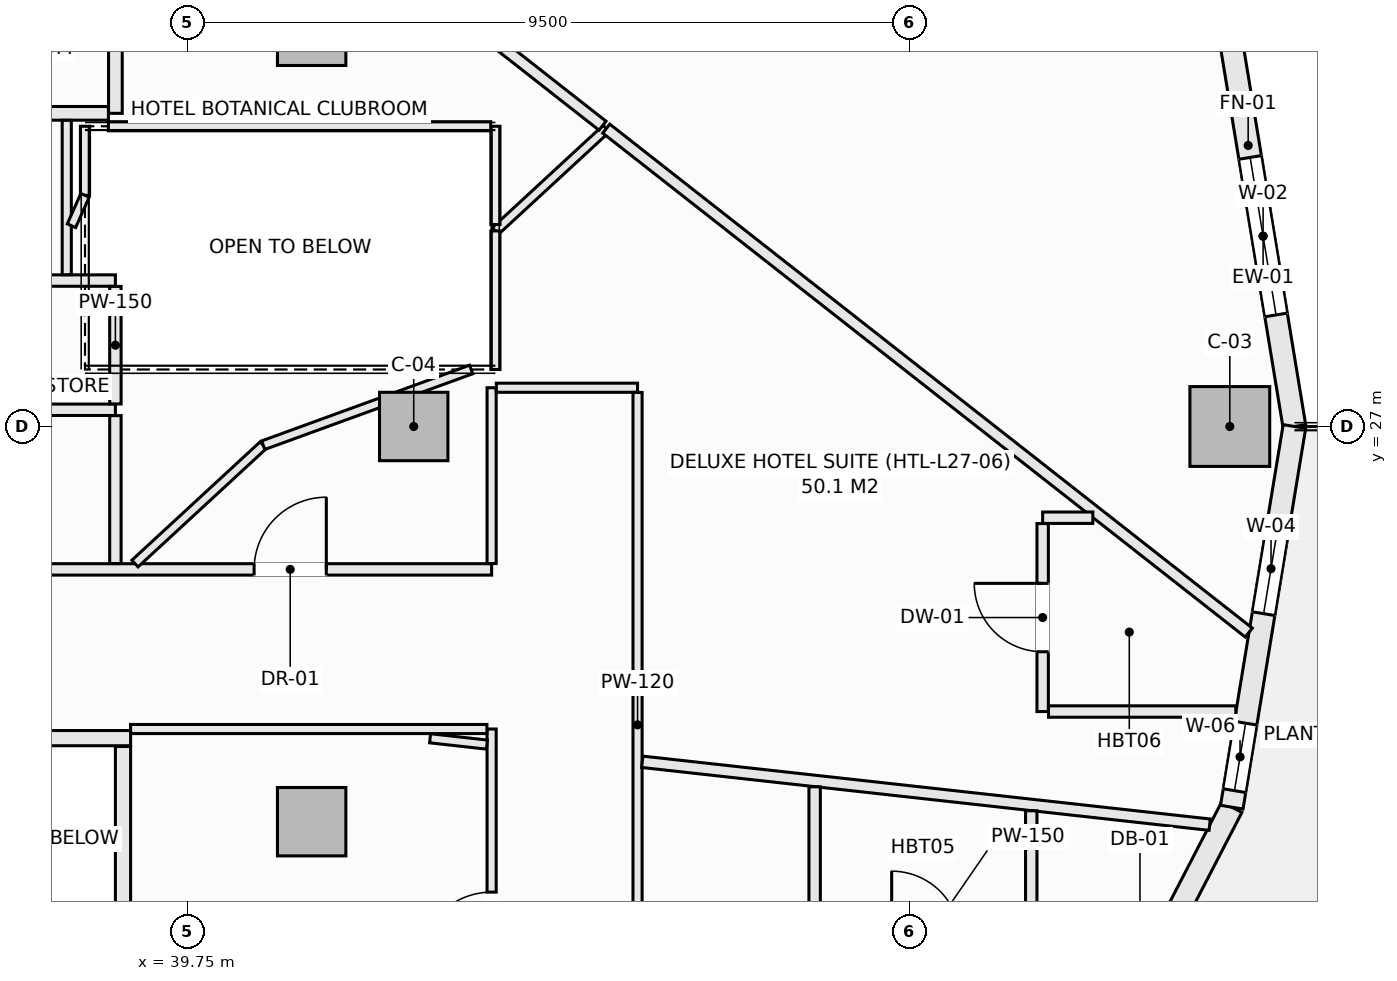
"""IFC4 building model, lengths in metres.
Left out: names, types, materials, properties, quantities, classifications, styles, units other than length and angle.
Written with IfcOpenShell. Run it as: python <this file> out.ifc"""

import sys

from ifc_helpers import new_model, si_unit, direction, frame, frame_2d, origin, origin_2d, place, context, subcontext, project, spatial, rectangle, extrude, element, fill, save


model = new_model("IFC4")
c1 = context("Model", 3, precision=1e-05, world=origin(), true_north=direction((0.0, 1.0)))
c2 = subcontext(c1, "Body", "Model", "MODEL_VIEW")
j1 = project(units=[si_unit("LENGTHUNIT", "METRE"), si_unit("PLANEANGLEUNIT", "RADIAN")], contexts=[c1])
p1 = place(None, origin())
s1 = spatial("IfcSite", under=j1, at=p1, CompositionType="ELEMENT")
p2 = place(p1, origin())
s2 = spatial("IfcBuilding", under=s1, at=p2, CompositionType="ELEMENT")
p3 = place(p2, frame((0.0, 0.0, 112.1)))
s3 = spatial("IfcBuildingStorey", under=s2, at=p3, CompositionType="ELEMENT", Elevation=112.1)
p4 = place(p3, frame((53.462, 27.0, -0.27), z_axis=(0.0, 0.0, 1.0), x_axis=(1.0, 0.0, 0.0)))
e1 = element("IfcColumn", 1, at=p4, inside=s3, PredefinedType="COLUMN", context=c2, shape_type="SweptSolid", body=[
    extrude(rectangle(XDim=1.05, YDim=1.05, at=origin_2d()), origin(), (0.0, 0.0, 1.0), 3.4),
])
for number, where, z_axis, x_axis in (
    (2, (42.725, 27.0, -0.27), (0.0, 0.0, 1.0), (1.0, 0.0, 0.0)),
    (3, (41.382, 32.199, -0.27), (0.0, 0.0, 1.0), (1.0, 0.0, 0.0)),
    (4, (41.382, 21.801, -0.27), (0.0, 0.0, 1.0), (1.0, 0.0, 0.0)),
):
    element("IfcColumn", number, at=place(p3, frame(where, z_axis=z_axis, x_axis=x_axis)), inside=s3, PredefinedType="COLUMN", context=c2, shape_type="SweptSolid", body=[
        extrude(rectangle(XDim=0.9, YDim=0.9, at=origin_2d()), origin(), (0.0, 0.0, 1.0), 3.4),
    ])
p5 = place(p3, frame((53.488, 32.008, 0.0), z_axis=(0.0, 0.0, 1.0), x_axis=(0.162393944769, -0.986726003864, 0.0)))
e5 = element("IfcWall", 5, at=p5, inside=s3, PredefinedType="SOLIDWALL", context=c2, shape_type="SweptSolid", body=[
    extrude(rectangle(XDim=5.075, YDim=0.3, at=frame_2d((2.538, 0.0))), origin(), (0.0, 0.0, 1.0), 2.653),
])
p6 = place(p5, frame((1.488, 0.0, 0.74)))
e6 = element("IfcOpeningElement", 6, at=p6, cuts=e5, PredefinedType="OPENING", context=c2, shape_type="SweptSolid", body=[
    extrude(rectangle(XDim=2.1, YDim=1.7, at=frame_2d((1.05, 0.85))), frame((0.0, 0.16, 0.0), z_axis=(0.0, -1.0, 0.0), x_axis=(1.0, 0.0, 0.0)), (0.0, 0.0, 1.0), 0.32),
])
p7 = place(p3, frame((51.072, 17.325, 0.0), z_axis=(0.0, 0.0, 1.0), x_axis=(0.459767899643, 0.888039119892, 0.0)))
e7 = element("IfcWall", 7, at=p7, inside=s3, PredefinedType="SOLIDWALL", context=c2, shape_type="SweptSolid", body=[
    extrude(rectangle(XDim=5.255, YDim=0.3, at=frame_2d((2.628, 0.0))), origin(), (0.0, 0.0, 1.0), 2.653),
])
p8 = place(p7, frame((1.728, 0.0, 0.0)))
e8 = element("IfcOpeningElement", 8, at=p8, cuts=e7, PredefinedType="OPENING", context=c2, shape_type="SweptSolid", body=[
    extrude(rectangle(XDim=1.8, YDim=2.25, at=frame_2d((0.9, 1.125))), frame((0.0, 0.16, 0.0), z_axis=(0.0, -1.0, 0.0), x_axis=(1.0, 0.0, 0.0)), (0.0, 0.0, 1.0), 0.32),
])
p9 = place(p3, frame((53.488, 21.992, 0.0), z_axis=(0.0, 0.0, 1.0), x_axis=(0.162393944769, 0.986726003864, 0.0)))
e9 = element("IfcWall", 9, at=p9, inside=s3, PredefinedType="SOLIDWALL", context=c2, shape_type="SweptSolid", body=[
    extrude(rectangle(XDim=5.075, YDim=0.3, at=frame_2d((2.538, 0.0))), origin(), (0.0, 0.0, 1.0), 2.653),
])
p10 = place(p9, frame((2.58, 0.0, 0.72)))
e10 = element("IfcOpeningElement", 10, at=p10, cuts=e9, PredefinedType="OPENING", context=c2, shape_type="SweptSolid", body=[
    extrude(rectangle(XDim=1.2, YDim=1.65, at=frame_2d((0.6, 0.825))), frame((0.0, 0.16, 0.0), z_axis=(0.0, -1.0, 0.0), x_axis=(1.0, 0.0, 0.0)), (0.0, 0.0, 1.0), 0.32),
])
p11 = place(p9, frame((0.22, 0.0, 0.72)))
e11 = element("IfcOpeningElement", 11, at=p11, cuts=e9, PredefinedType="OPENING", context=c2, shape_type="SweptSolid", body=[
    extrude(rectangle(XDim=0.9, YDim=1.65, at=frame_2d((0.45, 0.825))), frame((0.0, 0.16, 0.0), z_axis=(0.0, -1.0, 0.0), x_axis=(1.0, 0.0, 0.0)), (0.0, 0.0, 1.0), 0.32),
])
p12 = place(p3, frame((54.129, 15.878, 0.0), z_axis=(0.0, 0.0, 1.0), x_axis=(0.441269631716, 0.897374566235, 0.0)))
e12 = element("IfcWall", 12, at=p12, inside=s3, PredefinedType="PARAPET", context=c2, shape_type="SweptSolid", body=[
    extrude(rectangle(XDim=6.056, YDim=0.22, at=frame_2d((3.028, 0.0))), origin(), (0.0, 0.0, 1.0), 0.52),
])
p13 = place(p3, frame((36.75, 22.9, 0.0), z_axis=(0.0, 0.0, 1.0), x_axis=(1.0, 0.0, 0.0)))
e13 = element("IfcWall", 13, at=p13, inside=s3, PredefinedType="SOLIDWALL", context=c2, shape_type="SweptSolid", body=[
    extrude(rectangle(XDim=2.25, YDim=0.2, at=frame_2d((1.125, 0.0))), origin(), (0.0, 0.0, 1.0), 3.13),
])
p14 = place(p3, frame((38.9, 20.36, 0.0), z_axis=(0.0, 0.0, 1.0), x_axis=(0.0, 1.0, 0.0)))
e14 = element("IfcWall", 14, at=p14, inside=s3, PredefinedType="SOLIDWALL", context=c2, shape_type="SweptSolid", body=[
    extrude(rectangle(XDim=2.43, YDim=0.2, at=frame_2d((1.215, 0.0))), origin(), (0.0, 0.0, 1.0), 3.13),
])
p15 = place(p3, frame((30.077, 28.92, 0.0), z_axis=(0.0, 0.0, 1.0), x_axis=(1.0, 0.0, 0.0)))
e15 = element("IfcWall", 15, at=p15, inside=s3, PredefinedType="PARTITIONING", context=c2, shape_type="SweptSolid", body=[
    extrude(rectangle(XDim=8.723, YDim=0.15, at=frame_2d((4.362, 0.0))), origin(), (0.0, 0.0, 1.0), 3.13),
])
p16 = place(p15, frame((1.342, 0.0, 0.0)))
e16 = element("IfcOpeningElement", 16, at=p16, cuts=e15, PredefinedType="OPENING", context=c2, shape_type="SweptSolid", body=[
    extrude(rectangle(XDim=0.95, YDim=2.1, at=frame_2d((0.475, 1.05))), frame((0.0, 0.085, 0.0), z_axis=(0.0, -1.0, 0.0), x_axis=(1.0, 0.0, 0.0)), (0.0, 0.0, 1.0), 0.17),
])
p17 = place(p15, frame((5.178, 0.0, 0.0)))
e17 = element("IfcOpeningElement", 17, at=p17, cuts=e15, PredefinedType="OPENING", context=c2, shape_type="SweptSolid", body=[
    extrude(rectangle(XDim=0.95, YDim=2.1, at=frame_2d((0.475, 1.05))), frame((0.0, 0.085, 0.0), z_axis=(0.0, -1.0, 0.0), x_axis=(1.0, 0.0, 0.0)), (0.0, 0.0, 1.0), 0.17),
])
p18 = place(p3, frame((33.377, 25.12, 0.0), z_axis=(0.0, 0.0, 1.0), x_axis=(1.0, 0.0, 0.0)))
e18 = element("IfcWall", 18, at=p18, inside=s3, PredefinedType="PARTITIONING", context=c2, shape_type="SweptSolid", body=[
    extrude(rectangle(XDim=10.373, YDim=0.15, at=frame_2d((5.187, 0.0))), origin(), (0.0, 0.0, 1.0), 3.13),
])
p19 = place(p18, frame((2.441, 0.0, 0.0)))
e19 = element("IfcOpeningElement", 19, at=p19, cuts=e18, PredefinedType="OPENING", context=c2, shape_type="SweptSolid", body=[
    extrude(rectangle(XDim=0.95, YDim=2.1, at=frame_2d((0.475, 1.05))), frame((0.0, 0.085, 0.0), z_axis=(0.0, -1.0, 0.0), x_axis=(1.0, 0.0, 0.0)), (0.0, 0.0, 1.0), 0.17),
])
p20 = place(p18, frame((7.248, 0.0, 0.0)))
e20 = element("IfcOpeningElement", 20, at=p20, cuts=e18, PredefinedType="OPENING", context=c2, shape_type="SweptSolid", body=[
    extrude(rectangle(XDim=0.95, YDim=2.1, at=frame_2d((0.475, 1.05))), frame((0.0, 0.085, 0.0), z_axis=(0.0, -1.0, 0.0), x_axis=(1.0, 0.0, 0.0)), (0.0, 0.0, 1.0), 0.17),
])
p21 = place(p3, frame((33.377, 27.22, 0.0), z_axis=(0.0, 0.0, 1.0), x_axis=(1.0, 0.0, 0.0)))
e21 = element("IfcWall", 21, at=p21, inside=s3, PredefinedType="PARTITIONING", context=c2, shape_type="SweptSolid", body=[
    extrude(rectangle(XDim=5.423, YDim=0.15, at=frame_2d((2.711, 0.0))), origin(), (0.0, 0.0, 1.0), 3.13),
])
p22 = place(p3, frame((38.8, 25.197, 0.0), z_axis=(0.0, 0.0, 1.0), x_axis=(0.0, 1.0, 0.0)))
e22 = element("IfcWall", 22, at=p22, inside=s3, PredefinedType="PARTITIONING", context=c2, shape_type="SweptSolid", body=[
    extrude(rectangle(XDim=1.946, YDim=0.15, at=frame_2d((0.973, 0.0))), origin(), (0.0, 0.0, 1.0), 3.13),
])
p23 = place(p3, frame((38.8, 27.297, 0.0), z_axis=(0.0, 0.0, 1.0), x_axis=(0.0, 1.0, 0.0)))
e23 = element("IfcWall", 23, at=p23, inside=s3, PredefinedType="PARTITIONING", context=c2, shape_type="SweptSolid", body=[
    extrude(rectangle(XDim=1.546, YDim=0.15, at=frame_2d((0.773, 0.0))), origin(), (0.0, 0.0, 1.0), 3.13),
])
p24 = place(p3, frame((38.8, 31.12, 0.0), z_axis=(0.0, 0.0, 1.0), x_axis=(0.0, 1.0, 0.0)))
e24 = element("IfcWall", 24, at=p24, inside=s3, PredefinedType="SOLIDWALL", context=c2, shape_type="SweptSolid", body=[
    extrude(rectangle(XDim=2.63, YDim=0.18, at=frame_2d((1.315, 0.0))), origin(), (0.0, 0.0, 1.0), 3.13),
])
p25 = place(p3, frame((30.077, 31.12, 0.0), z_axis=(0.0, 0.0, 1.0), x_axis=(1.0, 0.0, 0.0)))
e25 = element("IfcWall", 25, at=p25, inside=s3, PredefinedType="SOLIDWALL", context=c2, shape_type="SweptSolid", body=[
    extrude(rectangle(XDim=8.631, YDim=0.18, at=frame_2d((4.315, 0.0))), origin(), (0.0, 0.0, 1.0), 3.13),
])
p26 = place(p25, frame((2.592, 0.0, 0.0)))
e26 = element("IfcOpeningElement", 26, at=p26, cuts=e25, PredefinedType="OPENING", context=c2, shape_type="SweptSolid", body=[
    extrude(rectangle(XDim=0.95, YDim=2.1, at=frame_2d((0.475, 1.05))), frame((0.0, 0.1, 0.0), z_axis=(0.0, -1.0, 0.0), x_axis=(1.0, 0.0, 0.0)), (0.0, 0.0, 1.0), 0.2),
])
p27 = place(p3, frame((38.16, 28.997, 0.0), z_axis=(0.0, 0.0, 1.0), x_axis=(0.0, 1.0, 0.0)))
e27 = element("IfcWall", 27, at=p27, inside=s3, PredefinedType="PARTITIONING", context=c2, shape_type="SweptSolid", body=[
    extrude(rectangle(XDim=2.031, YDim=0.12, at=frame_2d((1.016, 0.0))), origin(), (0.0, 0.0, 1.0), 3.13),
])
p28 = place(p3, frame((43.75, 17.779, 0.0), z_axis=(0.0, 0.0, 1.0), x_axis=(0.0, 1.0, 0.0)))
e28 = element("IfcWall", 28, at=p28, inside=s3, PredefinedType="PARTITIONING", context=c2, shape_type="SweptSolid", body=[
    extrude(rectangle(XDim=5.241, YDim=0.12, at=frame_2d((2.621, 0.0))), origin(), (0.0, 0.0, 1.0), 3.13),
])
p29 = place(p28, frame((2.146, 0.0, 0.0)))
e29 = element("IfcOpeningElement", 29, at=p29, cuts=e28, PredefinedType="OPENING", context=c2, shape_type="SweptSolid", body=[
    extrude(rectangle(XDim=0.95, YDim=2.1, at=frame_2d((0.475, 1.05))), frame((0.0, 0.07, 0.0), z_axis=(0.0, -1.0, 0.0), x_axis=(1.0, 0.0, 0.0)), (0.0, 0.0, 1.0), 0.14),
])
p30 = place(p3, frame((43.75, 25.197, 0.0), z_axis=(0.0, 0.0, 1.0), x_axis=(0.0, 1.0, 0.0)))
e30 = element("IfcWall", 30, at=p30, inside=s3, PredefinedType="PARTITIONING", context=c2, shape_type="SweptSolid", body=[
    extrude(rectangle(XDim=2.313, YDim=0.12, at=frame_2d((1.156, 0.0))), origin(), (0.0, 0.0, 1.0), 3.13),
])
p31 = place(p3, frame((43.812, 27.51, 0.0), z_axis=(0.0, 0.0, 1.0), x_axis=(1.0, 0.0, 0.0)))
e31 = element("IfcWall", 31, at=p31, inside=s3, PredefinedType="PARTITIONING", context=c2, shape_type="SweptSolid", body=[
    extrude(rectangle(XDim=1.858, YDim=0.12, at=frame_2d((0.929, 0.0))), origin(), (0.0, 0.0, 1.0), 3.13),
])
p32 = place(p3, frame((45.67, 18.701, 0.0), z_axis=(0.0, 0.0, 1.0), x_axis=(0.0, 1.0, 0.0)))
e32 = element("IfcWall", 32, at=p32, inside=s3, PredefinedType="PARTITIONING", context=c2, shape_type="SweptSolid", body=[
    extrude(rectangle(XDim=8.747, YDim=0.12, at=frame_2d((4.374, 0.0))), origin(), (0.0, 0.0, 1.0), 3.13),
])
p33 = place(p3, frame((39.0, 23.02, 0.0), z_axis=(0.0, 0.0, 1.0), x_axis=(1.0, 0.0, 0.0)))
e33 = element("IfcWall", 33, at=p33, inside=s3, PredefinedType="PARTITIONING", context=c2, shape_type="SweptSolid", body=[
    extrude(rectangle(XDim=4.688, YDim=0.12, at=frame_2d((2.344, 0.0))), origin(), (0.0, 0.0, 1.0), 3.13),
])
p34 = place(p3, frame((42.941, 22.898, 0.0), z_axis=(0.0, 0.0, 1.0), x_axis=(0.993923268999, -0.110075134986, 0.0)))
e34 = element("IfcWall", 34, at=p34, inside=s3, PredefinedType="PARTITIONING", context=c2, shape_type="SweptSolid", body=[
    extrude(rectangle(XDim=0.752, YDim=0.12, at=frame_2d((0.376, 0.0))), origin(), (0.0, 0.0, 1.0), 3.13),
])
p35 = place(p3, frame((45.732, 22.589, 0.0), z_axis=(0.0, 0.0, 1.0), x_axis=(0.993915007742, -0.110149704422, 0.0)))
e35 = element("IfcWall", 35, at=p35, inside=s3, PredefinedType="PARTITIONING", context=c2, shape_type="SweptSolid", body=[
    extrude(rectangle(XDim=7.511, YDim=0.15, at=frame_2d((3.756, 0.0))), origin(), (0.0, 0.0, 1.0), 3.13),
])
p36 = place(p3, frame((48.0, 20.25, 0.0), z_axis=(0.0, 0.0, 1.0), x_axis=(0.0, 1.0, 0.0)))
e36 = element("IfcWall", 36, at=p36, inside=s3, PredefinedType="PARTITIONING", context=c2, shape_type="SweptSolid", body=[
    extrude(rectangle(XDim=2.01, YDim=0.15, at=frame_2d((1.005, 0.0))), origin(), (0.0, 0.0, 1.0), 3.13),
])
p37 = place(p3, frame((50.85, 20.327, 0.0), z_axis=(0.0, 0.0, 1.0), x_axis=(0.0, 1.0, 0.0)))
e37 = element("IfcWall", 37, at=p37, inside=s3, PredefinedType="PARTITIONING", context=c2, shape_type="SweptSolid", body=[
    extrude(rectangle(XDim=1.617, YDim=0.15, at=frame_2d((0.809, 0.0))), origin(), (0.0, 0.0, 1.0), 3.13),
])
p38 = place(p3, frame((39.058, 25.197, 0.0), z_axis=(0.0, 0.0, 1.0), x_axis=(0.73497871786, 0.67809017416, 0.0)))
e38 = element("IfcWall", 38, at=p38, inside=s3, PredefinedType="PARTITIONING", context=c2, shape_type="SweptSolid", body=[
    extrude(rectangle(XDim=2.296, YDim=0.12, at=frame_2d((1.148, 0.0))), origin(), (0.0, 0.0, 1.0), 3.13),
])
p39 = place(p3, frame((43.8, 29.573, 0.0), z_axis=(0.0, 0.0, 1.0), x_axis=(0.734897778704, 0.678177893222, 0.0)))
e39 = element("IfcWall", 39, at=p39, inside=s3, PredefinedType="PARTITIONING", context=c2, shape_type="SweptSolid", body=[
    extrude(rectangle(XDim=1.984, YDim=0.12, at=frame_2d((0.992, 0.0))), origin(), (0.0, 0.0, 1.0), 3.13),
])
p40 = place(p3, frame((40.745, 26.754, 0.0), z_axis=(0.0, 0.0, 1.0), x_axis=(0.939656245212, 0.342120067862, 0.0)))
e40 = element("IfcWall", 40, at=p40, inside=s3, PredefinedType="PARTITIONING", context=c2, shape_type="SweptSolid", body=[
    extrude(rectangle(XDim=2.912, YDim=0.12, at=frame_2d((1.456, 0.0))), origin(), (0.0, 0.0, 1.0), 3.13),
])
p41 = place(p3, frame((43.8, 27.75, 0.0), z_axis=(0.0, 0.0, 1.0), x_axis=(0.0, 1.0, 0.0)))
e41 = element("IfcWall", 41, at=p41, inside=s3, PredefinedType="PARTITIONING", context=c2, shape_type="SweptSolid", body=[
    extrude(rectangle(XDim=1.823, YDim=0.12, at=frame_2d((0.912, 0.0))), origin(), (0.0, 0.0, 1.0), 3.13),
])
p42 = place(p3, frame((43.8, 29.657, 0.0), z_axis=(0.0, 0.0, 1.0), x_axis=(0.0, 1.0, 0.0)))
e42 = element("IfcWall", 42, at=p42, inside=s3, PredefinedType="PARTITIONING", context=c2, shape_type="SweptSolid", body=[
    extrude(rectangle(XDim=1.293, YDim=0.12, at=frame_2d((0.646, 0.0))), origin(), (0.0, 0.0, 1.0), 3.13),
])
p43 = place(p3, frame((34.112, 39.661, 0.0), z_axis=(0.0, 0.0, 1.0), x_axis=(0.786863471843, -0.617127115495, 0.0)))
e43 = element("IfcWall", 43, at=p43, inside=s3, PredefinedType="PARTITIONING", context=c2, shape_type="SweptSolid", body=[
    extrude(rectangle(XDim=14.103, YDim=0.15, at=frame_2d((7.052, 0.0))), origin(), (0.0, 0.0, 1.0), 2.505),
])
p44 = place(p3, frame((45.258, 30.919, 0.0), z_axis=(0.0, 0.0, 1.0), x_axis=(0.786869212034, -0.617119796436, 0.0)))
e44 = element("IfcWall", 44, at=p44, inside=s3, PredefinedType="PARTITIONING", context=c2, shape_type="SweptSolid", body=[
    extrude(rectangle(XDim=10.744, YDim=0.15, at=frame_2d((5.372, 0.0))), origin(), (0.0, 0.0, 1.0), 2.505),
])
p45 = place(p3, frame((51.0, 25.8, 0.0), z_axis=(0.0, 0.0, 1.0), x_axis=(1.0, 0.0, 0.0)))
e45 = element("IfcWall", 45, at=p45, inside=s3, PredefinedType="PARTITIONING", context=c2, shape_type="SweptSolid", body=[
    extrude(rectangle(XDim=0.66, YDim=0.15, at=frame_2d((0.33, 0.0))), origin(), (0.0, 0.0, 1.0), 3.13),
])
p46 = place(p3, frame((51.0, 23.25, 0.0), z_axis=(0.0, 0.0, 1.0), x_axis=(0.0, 1.0, 0.0)))
e46 = element("IfcWall", 46, at=p46, inside=s3, PredefinedType="PARTITIONING", context=c2, shape_type="SweptSolid", body=[
    extrude(rectangle(XDim=2.473, YDim=0.15, at=frame_2d((1.236, 0.0))), origin(), (0.0, 0.0, 1.0), 3.13),
])
p47 = place(p46, frame((0.787, 0.0, 0.0)))
e47 = element("IfcOpeningElement", 47, at=p47, cuts=e46, PredefinedType="OPENING", context=c2, shape_type="SweptSolid", body=[
    extrude(rectangle(XDim=0.9, YDim=2.1, at=frame_2d((0.45, 1.05))), frame((0.0, 0.085, 0.0), z_axis=(0.0, -1.0, 0.0), x_axis=(1.0, 0.0, 0.0)), (0.0, 0.0, 1.0), 0.17),
])
p48 = place(p3, frame((51.077, 23.25, 0.0), z_axis=(0.0, 0.0, 1.0), x_axis=(1.0, 0.0, 0.0)))
e48 = element("IfcWall", 48, at=p48, inside=s3, PredefinedType="PARTITIONING", context=c2, shape_type="SweptSolid", body=[
    extrude(rectangle(XDim=2.464, YDim=0.15, at=frame_2d((1.232, 0.0))), origin(), (0.0, 0.0, 1.0), 3.13),
])
p49 = place(p3, frame((38.708, 30.95, 0.0), z_axis=(0.0, 0.0, 1.0), x_axis=(1.0, 0.0, 0.0)))
e49 = element("IfcWall", 49, at=p49, inside=s3, PredefinedType="PARTITIONING", context=c2, shape_type="SweptSolid", body=[
    extrude(rectangle(XDim=5.03, YDim=0.12, at=frame_2d((2.515, 0.0))), origin(), (0.0, 0.0, 1.0), 3.13),
])
p50 = place(p3, frame((38.4, 30.041, 0.0), z_axis=(0.0, 0.0, 1.0), x_axis=(0.0, 1.0, 0.0)))
e50 = element("IfcWall", 50, at=p50, inside=s3, PredefinedType="PARTITIONING", context=c2, shape_type="SweptSolid", body=[
    extrude(rectangle(XDim=0.909, YDim=0.12, at=frame_2d((0.455, 0.0))), origin(), (0.0, 0.0, 1.0), 3.13),
])
p51 = place(p3, frame((38.222, 29.641, 0.0), z_axis=(0.0, 0.0, 1.0), x_axis=(0.406604168362, 0.913604427677, 0.0)))
e51 = element("IfcWall", 51, at=p51, inside=s3, PredefinedType="PARTITIONING", context=c2, shape_type="SweptSolid", body=[
    extrude(rectangle(XDim=0.438, YDim=0.12, at=frame_2d((0.219, 0.0))), origin(), (0.0, 0.0, 1.0), 3.13),
])
p52 = place(p6, origin())
e52 = element("IfcWindow", 52, at=p52, inside=s3, PartitioningType="SINGLE_PANEL", PredefinedType="WINDOW", context=c2, shape_type="SweptSolid", body=[
    extrude(rectangle(XDim=2.1, YDim=1.7, at=frame_2d((1.05, 0.85))), frame((0.0, 0.03, 0.0), z_axis=(0.0, -1.0, 0.0), x_axis=(1.0, 0.0, 0.0)), (0.0, 0.0, 1.0), 0.06),
])
fill(e6, e52)
p53 = place(p10, origin())
e53 = element("IfcWindow", 53, at=p53, inside=s3, PartitioningType="SINGLE_PANEL", PredefinedType="WINDOW", context=c2, shape_type="SweptSolid", body=[
    extrude(rectangle(XDim=1.2, YDim=1.65, at=frame_2d((0.6, 0.825))), frame((0.0, 0.03, 0.0), z_axis=(0.0, -1.0, 0.0), x_axis=(1.0, 0.0, 0.0)), (0.0, 0.0, 1.0), 0.06),
])
fill(e10, e53)
p54 = place(p29, origin())
e54 = element("IfcDoor", 54, at=p54, inside=s3, OperationType="SINGLE_SWING_LEFT", PredefinedType="DOOR", context=c2, shape_type="SweptSolid", body=[
    extrude(rectangle(XDim=0.95, YDim=2.1, at=frame_2d((0.475, 1.05))), frame((0.0, 0.025, 0.0), z_axis=(0.0, -1.0, 0.0), x_axis=(1.0, 0.0, 0.0)), (0.0, 0.0, 1.0), 0.05),
])
fill(e29, e54)
p55 = place(p20, origin())
e55 = element("IfcDoor", 55, at=p55, inside=s3, OperationType="SINGLE_SWING_RIGHT", PredefinedType="DOOR", context=c2, shape_type="SweptSolid", body=[
    extrude(rectangle(XDim=0.95, YDim=2.1, at=frame_2d((0.475, 1.05))), frame((0.0, 0.025, 0.0), z_axis=(0.0, -1.0, 0.0), x_axis=(1.0, 0.0, 0.0)), (0.0, 0.0, 1.0), 0.05),
])
fill(e20, e55)
p56 = place(p47, origin())
e56 = element("IfcDoor", 56, at=p56, inside=s3, OperationType="SINGLE_SWING_RIGHT", PredefinedType="DOOR", context=c2, shape_type="SweptSolid", body=[
    extrude(rectangle(XDim=0.9, YDim=2.1, at=frame_2d((0.45, 1.05))), frame((0.0, 0.025, 0.0), z_axis=(0.0, -1.0, 0.0), x_axis=(1.0, 0.0, 0.0)), (0.0, 0.0, 1.0), 0.05),
])
fill(e47, e56)
p57 = place(p11, origin())
e57 = element("IfcWindow", 57, at=p57, inside=s3, PartitioningType="SINGLE_PANEL", PredefinedType="WINDOW", context=c2, shape_type="SweptSolid", body=[
    extrude(rectangle(XDim=0.9, YDim=1.65, at=frame_2d((0.45, 0.825))), frame((0.0, 0.03, 0.0), z_axis=(0.0, -1.0, 0.0), x_axis=(1.0, 0.0, 0.0)), (0.0, 0.0, 1.0), 0.06),
])
fill(e11, e57)
save(model, sys.argv[1])
